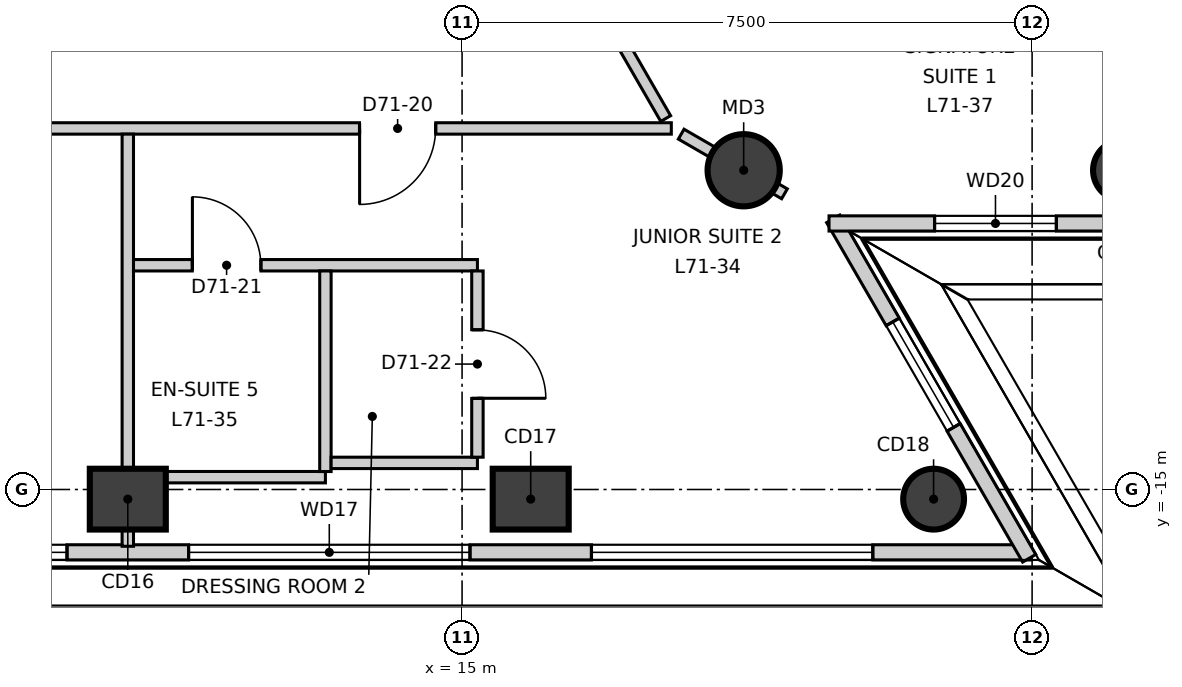
"""IFC4 building model, lengths in metres.
Left out: names, types, materials, properties, quantities, classifications, styles, units other than length and angle.
Written with IfcOpenShell. Run it as: python <this file> out.ifc"""

import sys

from ifc_helpers import new_model, si_unit, direction, frame, frame_2d, origin, origin_2d, place, context, subcontext, project, spatial, rectangle, circle, extrude, element, fill, save


model = new_model("IFC4")
c1 = context("Model", 3, precision=1e-05, world=origin(), true_north=direction((0.0, 1.0)))
c2 = subcontext(c1, "Body", "Model", "MODEL_VIEW")
j1 = project(units=[si_unit("LENGTHUNIT", "METRE"), si_unit("PLANEANGLEUNIT", "RADIAN")], contexts=[c1])
p1 = place(None, origin())
s1 = spatial("IfcSite", under=j1, at=p1, CompositionType="ELEMENT")
p2 = place(p1, origin())
s2 = spatial("IfcBuilding", under=s1, at=p2, CompositionType="ELEMENT")
p3 = place(p2, frame((0.0, 0.0, 300.7)))
s3 = spatial("IfcBuildingStorey", under=s2, at=p3, CompositionType="ELEMENT", Elevation=300.7)
for number, where, z_axis, x_axis in (
    (1, (10.602, -15.127, -0.3), (0.0, 0.0, 1.0), (1.0, 0.0, 0.0)),
    (2, (15.903, -15.127, -0.3), (0.0, 0.0, 1.0), (1.0, 0.0, 0.0)),
):
    element("IfcColumn", number, at=place(p3, frame(where, z_axis=z_axis, x_axis=x_axis)), inside=s3, PredefinedType="COLUMN", context=c2, shape_type="SweptSolid", body=[
        extrude(rectangle(XDim=1.0, YDim=0.8, at=origin_2d()), origin(), (0.0, 0.0, 1.0), 3.6),
    ])
for number, where, z_axis, x_axis in (
    (3, (21.204, -15.127, -0.3), (0.0, 0.0, 1.0), (1.0, 0.0, 0.0)),
    (4, (23.702, -10.8, -0.3), (0.0, 0.0, 1.0), (-0.5, 0.866, 0.0)),
):
    element("IfcColumn", number, at=place(p3, frame(where, z_axis=z_axis, x_axis=x_axis)), inside=s3, PredefinedType="COLUMN", context=c2, shape_type="SweptSolid", body=[
        extrude(circle(Radius=0.4, at=origin_2d()), origin(), (0.0, 0.0, 1.0), 3.6),
    ])
p4 = place(p3, frame((18.705, -10.8, -0.3), z_axis=(0.0, 0.0, 1.0), x_axis=(1.0, 0.0, 0.0)))
e5 = element("IfcColumn", 5, at=p4, inside=s3, PredefinedType="COLUMN", context=c2, shape_type="SweptSolid", body=[
    extrude(circle(Radius=0.475, at=origin_2d()), origin(), (0.0, 0.0, 1.0), 3.6),
])
p5 = place(p3, frame((-22.507, -15.827, 0.0), z_axis=(0.0, 0.0, 1.0), x_axis=(1.0, 0.0, 0.0)))
e6 = element("IfcWall", 6, at=p5, inside=s3, PredefinedType="ELEMENTEDWALL", context=c2, shape_type="SweptSolid", body=[
    extrude(rectangle(XDim=44.994, YDim=0.2, at=frame_2d((22.497, 0.0))), origin(), (0.0, 0.0, 1.0), 3.3),
])
p6 = place(p5, frame((2.104, 0.0, 0.9)))
e7 = element("IfcOpeningElement", 7, at=p6, cuts=e6, PredefinedType="OPENING", context=c2, shape_type="SweptSolid", body=[
    extrude(rectangle(XDim=3.7, YDim=2.2, at=frame_2d((1.85, 1.1))), frame((0.0, 0.11, 0.0), z_axis=(0.0, -1.0, 0.0), x_axis=(1.0, 0.0, 0.0)), (0.0, 0.0, 1.0), 0.22),
])
p7 = place(p5, frame((7.405, 0.0, 0.9)))
e8 = element("IfcOpeningElement", 8, at=p7, cuts=e6, PredefinedType="OPENING", context=c2, shape_type="SweptSolid", body=[
    extrude(rectangle(XDim=3.7, YDim=2.2, at=frame_2d((1.85, 1.1))), frame((0.0, 0.11, 0.0), z_axis=(0.0, -1.0, 0.0), x_axis=(1.0, 0.0, 0.0)), (0.0, 0.0, 1.0), 0.22),
])
p8 = place(p5, frame((12.706, 0.0, 0.9)))
e9 = element("IfcOpeningElement", 9, at=p8, cuts=e6, PredefinedType="OPENING", context=c2, shape_type="SweptSolid", body=[
    extrude(rectangle(XDim=3.7, YDim=2.2, at=frame_2d((1.85, 1.1))), frame((0.0, 0.11, 0.0), z_axis=(0.0, -1.0, 0.0), x_axis=(1.0, 0.0, 0.0)), (0.0, 0.0, 1.0), 0.22),
])
p9 = place(p5, frame((18.006, 0.0, 0.9)))
e10 = element("IfcOpeningElement", 10, at=p9, cuts=e6, PredefinedType="OPENING", context=c2, shape_type="SweptSolid", body=[
    extrude(rectangle(XDim=3.7, YDim=2.2, at=frame_2d((1.85, 1.1))), frame((0.0, 0.11, 0.0), z_axis=(0.0, -1.0, 0.0), x_axis=(1.0, 0.0, 0.0)), (0.0, 0.0, 1.0), 0.22),
])
p10 = place(p5, frame((23.308, 0.0, 0.9)))
e11 = element("IfcOpeningElement", 11, at=p10, cuts=e6, PredefinedType="OPENING", context=c2, shape_type="SweptSolid", body=[
    extrude(rectangle(XDim=3.7, YDim=2.2, at=frame_2d((1.85, 1.1))), frame((0.0, 0.11, 0.0), z_axis=(0.0, -1.0, 0.0), x_axis=(1.0, 0.0, 0.0)), (0.0, 0.0, 1.0), 0.22),
])
p11 = place(p5, frame((28.608, 0.0, 0.9)))
e12 = element("IfcOpeningElement", 12, at=p11, cuts=e6, PredefinedType="OPENING", context=c2, shape_type="SweptSolid", body=[
    extrude(rectangle(XDim=3.7, YDim=2.2, at=frame_2d((1.85, 1.1))), frame((0.0, 0.11, 0.0), z_axis=(0.0, -1.0, 0.0), x_axis=(1.0, 0.0, 0.0)), (0.0, 0.0, 1.0), 0.22),
])
p12 = place(p5, frame((33.91, 0.0, 0.9)))
e13 = element("IfcOpeningElement", 13, at=p12, cuts=e6, PredefinedType="OPENING", context=c2, shape_type="SweptSolid", body=[
    extrude(rectangle(XDim=3.7, YDim=2.2, at=frame_2d((1.85, 1.1))), frame((0.0, 0.11, 0.0), z_axis=(0.0, -1.0, 0.0), x_axis=(1.0, 0.0, 0.0)), (0.0, 0.0, 1.0), 0.22),
])
p13 = place(p5, frame((39.21, 0.0, 0.9)))
e14 = element("IfcOpeningElement", 14, at=p13, cuts=e6, PredefinedType="OPENING", context=c2, shape_type="SweptSolid", body=[
    extrude(rectangle(XDim=3.7, YDim=2.2, at=frame_2d((1.85, 1.1))), frame((0.0, 0.11, 0.0), z_axis=(0.0, -1.0, 0.0), x_axis=(1.0, 0.0, 0.0)), (0.0, 0.0, 1.0), 0.22),
])
p14 = place(p3, frame((22.462, -15.905, 0.0), z_axis=(0.0, 0.0, 1.0), x_axis=(-0.500054376048, 0.865994007483, 0.0)))
e15 = element("IfcWall", 15, at=p14, inside=s3, PredefinedType="ELEMENTEDWALL", context=c2, shape_type="SweptSolid", body=[
    extrude(rectangle(XDim=5.157, YDim=0.2, at=frame_2d((2.579, 0.0))), origin(), (0.0, 0.0, 1.0), 3.3),
])
p15 = place(p14, frame((1.99, 0.0, 0.9)))
e16 = element("IfcOpeningElement", 16, at=p15, cuts=e15, PredefinedType="OPENING", context=c2, shape_type="SweptSolid", body=[
    extrude(rectangle(XDim=1.6, YDim=2.2, at=frame_2d((0.8, 1.1))), frame((0.0, 0.11, 0.0), z_axis=(0.0, -1.0, 0.0), x_axis=(1.0, 0.0, 0.0)), (0.0, 0.0, 1.0), 0.22),
])
p16 = place(p3, frame((19.828, -11.5, 0.0), z_axis=(0.0, 0.0, 1.0), x_axis=(1.0, 0.0, 0.0)))
e17 = element("IfcWall", 17, at=p16, inside=s3, PredefinedType="ELEMENTEDWALL", context=c2, shape_type="SweptSolid", body=[
    extrude(rectangle(XDim=5.157, YDim=0.2, at=frame_2d((2.579, 0.0))), origin(), (0.0, 0.0, 1.0), 3.3),
])
p17 = place(p16, frame((1.39, 0.0, 0.9)))
e18 = element("IfcOpeningElement", 18, at=p17, cuts=e17, PredefinedType="OPENING", context=c2, shape_type="SweptSolid", body=[
    extrude(rectangle(XDim=1.6, YDim=2.2, at=frame_2d((0.8, 1.1))), frame((0.0, 0.11, 0.0), z_axis=(0.0, -1.0, 0.0), x_axis=(1.0, 0.0, 0.0)), (0.0, 0.0, 1.0), 0.22),
])
p18 = place(p3, frame((24.96, -11.578, 0.0), z_axis=(0.0, 0.0, 1.0), x_axis=(-0.500002391419, 0.866024023094, 0.0)))
e19 = element("IfcWall", 19, at=p18, inside=s3, PredefinedType="ELEMENTEDWALL", context=c2, shape_type="SweptSolid", body=[
    extrude(rectangle(XDim=44.994, YDim=0.2, at=frame_2d((22.497, 0.0))), origin(), (0.0, 0.0, 1.0), 3.3),
])
p19 = place(p18, frame((2.103, 0.0, 0.9)))
e20 = element("IfcOpeningElement", 20, at=p19, cuts=e19, PredefinedType="OPENING", context=c2, shape_type="SweptSolid", body=[
    extrude(rectangle(XDim=3.7, YDim=2.2, at=frame_2d((1.85, 1.1))), frame((0.0, 0.11, 0.0), z_axis=(0.0, -1.0, 0.0), x_axis=(1.0, 0.0, 0.0)), (0.0, 0.0, 1.0), 0.22),
])
p20 = place(p18, frame((7.404, 0.0, 0.9)))
e21 = element("IfcOpeningElement", 21, at=p20, cuts=e19, PredefinedType="OPENING", context=c2, shape_type="SweptSolid", body=[
    extrude(rectangle(XDim=3.7, YDim=2.2, at=frame_2d((1.85, 1.1))), frame((0.0, 0.11, 0.0), z_axis=(0.0, -1.0, 0.0), x_axis=(1.0, 0.0, 0.0)), (0.0, 0.0, 1.0), 0.22),
])
p21 = place(p18, frame((12.705, 0.0, 0.9)))
e22 = element("IfcOpeningElement", 22, at=p21, cuts=e19, PredefinedType="OPENING", context=c2, shape_type="SweptSolid", body=[
    extrude(rectangle(XDim=3.7, YDim=2.2, at=frame_2d((1.85, 1.1))), frame((0.0, 0.11, 0.0), z_axis=(0.0, -1.0, 0.0), x_axis=(1.0, 0.0, 0.0)), (0.0, 0.0, 1.0), 0.22),
])
p22 = place(p18, frame((18.006, 0.0, 0.9)))
e23 = element("IfcOpeningElement", 23, at=p22, cuts=e19, PredefinedType="OPENING", context=c2, shape_type="SweptSolid", body=[
    extrude(rectangle(XDim=3.7, YDim=2.2, at=frame_2d((1.85, 1.1))), frame((0.0, 0.11, 0.0), z_axis=(0.0, -1.0, 0.0), x_axis=(1.0, 0.0, 0.0)), (0.0, 0.0, 1.0), 0.22),
])
p23 = place(p18, frame((23.308, 0.0, 0.9)))
e24 = element("IfcOpeningElement", 24, at=p23, cuts=e19, PredefinedType="OPENING", context=c2, shape_type="SweptSolid", body=[
    extrude(rectangle(XDim=3.7, YDim=2.2, at=frame_2d((1.85, 1.1))), frame((0.0, 0.11, 0.0), z_axis=(0.0, -1.0, 0.0), x_axis=(1.0, 0.0, 0.0)), (0.0, 0.0, 1.0), 0.22),
])
p24 = place(p18, frame((28.609, 0.0, 0.9)))
e25 = element("IfcOpeningElement", 25, at=p24, cuts=e19, PredefinedType="OPENING", context=c2, shape_type="SweptSolid", body=[
    extrude(rectangle(XDim=3.7, YDim=2.2, at=frame_2d((1.85, 1.1))), frame((0.0, 0.11, 0.0), z_axis=(0.0, -1.0, 0.0), x_axis=(1.0, 0.0, 0.0)), (0.0, 0.0, 1.0), 0.22),
])
p25 = place(p18, frame((33.91, 0.0, 0.9)))
e26 = element("IfcOpeningElement", 26, at=p25, cuts=e19, PredefinedType="OPENING", context=c2, shape_type="SweptSolid", body=[
    extrude(rectangle(XDim=3.7, YDim=2.2, at=frame_2d((1.85, 1.1))), frame((0.0, 0.11, 0.0), z_axis=(0.0, -1.0, 0.0), x_axis=(1.0, 0.0, 0.0)), (0.0, 0.0, 1.0), 0.22),
])
p26 = place(p18, frame((39.211, 0.0, 0.9)))
e27 = element("IfcOpeningElement", 27, at=p26, cuts=e19, PredefinedType="OPENING", context=c2, shape_type="SweptSolid", body=[
    extrude(rectangle(XDim=3.7, YDim=2.2, at=frame_2d((1.85, 1.1))), frame((0.0, 0.11, 0.0), z_axis=(0.0, -1.0, 0.0), x_axis=(1.0, 0.0, 0.0)), (0.0, 0.0, 1.0), 0.22),
])
p27 = place(p3, frame((-17.603, -10.25, 0.0), z_axis=(0.0, 0.0, 1.0), x_axis=(1.0, 0.0, 0.0)))
e28 = element("IfcWall", 28, at=p27, inside=s3, PredefinedType="PARTITIONING", context=c2, shape_type="SweptSolid", body=[
    extrude(rectangle(XDim=35.356, YDim=0.15, at=frame_2d((17.678, 0.0))), origin(), (0.0, 0.0, 1.0), 3.3),
])
p28 = place(p27, frame((2.9, 0.0, 0.0)))
e29 = element("IfcOpeningElement", 29, at=p28, cuts=e28, PredefinedType="OPENING", context=c2, shape_type="SweptSolid", body=[
    extrude(rectangle(XDim=1.0, YDim=2.1, at=frame_2d((0.5, 1.05))), frame((0.0, 0.085, 0.0), z_axis=(0.0, -1.0, 0.0), x_axis=(1.0, 0.0, 0.0)), (0.0, 0.0, 1.0), 0.17),
])
p29 = place(p27, frame((10.351, 0.0, 0.0)))
e30 = element("IfcOpeningElement", 30, at=p29, cuts=e28, PredefinedType="OPENING", context=c2, shape_type="SweptSolid", body=[
    extrude(rectangle(XDim=1.0, YDim=2.1, at=frame_2d((0.5, 1.05))), frame((0.0, 0.085, 0.0), z_axis=(0.0, -1.0, 0.0), x_axis=(1.0, 0.0, 0.0)), (0.0, 0.0, 1.0), 0.17),
])
p30 = place(p27, frame((15.652, 0.0, 0.0)))
e31 = element("IfcOpeningElement", 31, at=p30, cuts=e28, PredefinedType="OPENING", context=c2, shape_type="SweptSolid", body=[
    extrude(rectangle(XDim=1.0, YDim=2.1, at=frame_2d((0.5, 1.05))), frame((0.0, 0.085, 0.0), z_axis=(0.0, -1.0, 0.0), x_axis=(1.0, 0.0, 0.0)), (0.0, 0.0, 1.0), 0.17),
])
p31 = place(p27, frame((24.753, 0.0, 0.0)))
e32 = element("IfcOpeningElement", 32, at=p31, cuts=e28, PredefinedType="OPENING", context=c2, shape_type="SweptSolid", body=[
    extrude(rectangle(XDim=1.0, YDim=2.1, at=frame_2d((0.5, 1.05))), frame((0.0, 0.085, 0.0), z_axis=(0.0, -1.0, 0.0), x_axis=(1.0, 0.0, 0.0)), (0.0, 0.0, 1.0), 0.17),
])
p32 = place(p27, frame((31.255, 0.0, 0.0)))
e33 = element("IfcOpeningElement", 33, at=p32, cuts=e28, PredefinedType="OPENING", context=c2, shape_type="SweptSolid", body=[
    extrude(rectangle(XDim=1.0, YDim=2.1, at=frame_2d((0.5, 1.05))), frame((0.0, 0.085, 0.0), z_axis=(0.0, -1.0, 0.0), x_axis=(1.0, 0.0, 0.0)), (0.0, 0.0, 1.0), 0.17),
])
p33 = place(p3, frame((17.883, -10.325, 0.0), z_axis=(0.0, 0.0, 1.0), x_axis=(0.865859083376, -0.500287964811, 0.0)))
e34 = element("IfcWall", 34, at=p33, inside=s3, PredefinedType="PARTITIONING", context=c2, shape_type="SweptSolid", body=[
    extrude(rectangle(XDim=1.569, YDim=0.15, at=frame_2d((0.785, 0.0))), origin(), (0.0, 0.0, 1.0), 2.8),
])
p34 = place(p3, frame((0.075, 20.37, 0.0), z_axis=(0.0, 0.0, 1.0), x_axis=(0.500009775255, -0.866019759965, 0.0)))
e35 = element("IfcWall", 35, at=p34, inside=s3, PredefinedType="PARTITIONING", context=c2, shape_type="SweptSolid", body=[
    extrude(rectangle(XDim=35.207, YDim=0.15, at=frame_2d((17.604, 0.0))), origin(), (0.0, 0.0, 1.0), 3.3),
])
p35 = place(p34, frame((31.307, 0.0, 0.0)))
e36 = element("IfcOpeningElement", 36, at=p35, cuts=e35, PredefinedType="OPENING", context=c2, shape_type="SweptSolid", body=[
    extrude(rectangle(XDim=1.0, YDim=2.1, at=frame_2d((0.5, 1.05))), frame((0.0, 0.085, 0.0), z_axis=(0.0, -1.0, 0.0), x_axis=(1.0, 0.0, 0.0)), (0.0, 0.0, 1.0), 0.17),
])
p36 = place(p34, frame((20.355, 0.0, 0.0)))
e37 = element("IfcOpeningElement", 37, at=p36, cuts=e35, PredefinedType="OPENING", context=c2, shape_type="SweptSolid", body=[
    extrude(rectangle(XDim=1.0, YDim=2.1, at=frame_2d((0.5, 1.05))), frame((0.0, 0.085, 0.0), z_axis=(0.0, -1.0, 0.0), x_axis=(1.0, 0.0, 0.0)), (0.0, 0.0, 1.0), 0.17),
])
p37 = place(p34, frame((24.355, 0.0, 0.0)))
e38 = element("IfcOpeningElement", 38, at=p37, cuts=e35, PredefinedType="OPENING", context=c2, shape_type="SweptSolid", body=[
    extrude(rectangle(XDim=0.9, YDim=2.1, at=frame_2d((0.45, 1.05))), frame((0.0, 0.085, 0.0), z_axis=(0.0, -1.0, 0.0), x_axis=(1.0, 0.0, 0.0)), (0.0, 0.0, 1.0), 0.17),
])
p38 = place(p34, frame((22.255, 0.0, 0.0)))
e39 = element("IfcOpeningElement", 39, at=p38, cuts=e35, PredefinedType="OPENING", context=c2, shape_type="SweptSolid", body=[
    extrude(rectangle(XDim=0.9, YDim=2.1, at=frame_2d((0.45, 1.05))), frame((0.0, 0.085, 0.0), z_axis=(0.0, -1.0, 0.0), x_axis=(1.0, 0.0, 0.0)), (0.0, 0.0, 1.0), 0.17),
])
p39 = place(p34, frame((8.453, 0.0, 0.0)))
e40 = element("IfcOpeningElement", 40, at=p39, cuts=e35, PredefinedType="OPENING", context=c2, shape_type="SweptSolid", body=[
    extrude(rectangle(XDim=1.0, YDim=2.1, at=frame_2d((0.5, 1.05))), frame((0.0, 0.085, 0.0), z_axis=(0.0, -1.0, 0.0), x_axis=(1.0, 0.0, 0.0)), (0.0, 0.0, 1.0), 0.17),
])
p40 = place(p34, frame((13.753, 0.0, 0.0)))
e41 = element("IfcOpeningElement", 41, at=p40, cuts=e35, PredefinedType="OPENING", context=c2, shape_type="SweptSolid", body=[
    extrude(rectangle(XDim=0.9, YDim=2.1, at=frame_2d((0.45, 1.05))), frame((0.0, 0.085, 0.0), z_axis=(0.0, -1.0, 0.0), x_axis=(1.0, 0.0, 0.0)), (0.0, 0.0, 1.0), 0.17),
])
p41 = place(p34, frame((11.553, 0.0, 0.0)))
e42 = element("IfcOpeningElement", 42, at=p41, cuts=e35, PredefinedType="OPENING", context=c2, shape_type="SweptSolid", body=[
    extrude(rectangle(XDim=0.9, YDim=2.1, at=frame_2d((0.45, 1.05))), frame((0.0, 0.085, 0.0), z_axis=(0.0, -1.0, 0.0), x_axis=(1.0, 0.0, 0.0)), (0.0, 0.0, 1.0), 0.17),
])
p42 = place(p34, frame((2.951, 0.0, 0.0)))
e43 = element("IfcOpeningElement", 43, at=p42, cuts=e35, PredefinedType="OPENING", context=c2, shape_type="SweptSolid", body=[
    extrude(rectangle(XDim=1.0, YDim=2.1, at=frame_2d((0.5, 1.05))), frame((0.0, 0.085, 0.0), z_axis=(0.0, -1.0, 0.0), x_axis=(1.0, 0.0, 0.0)), (0.0, 0.0, 1.0), 0.17),
])
p43 = place(p3, frame((10.602, -15.747, 0.0), z_axis=(0.0, 0.0, 1.0), x_axis=(0.0, 1.0, 0.0)))
e44 = element("IfcWall", 44, at=p43, inside=s3, PredefinedType="PARTITIONING", context=c2, shape_type="SweptSolid", body=[
    extrude(rectangle(XDim=5.422, YDim=0.15, at=frame_2d((2.711, 0.0))), origin(), (0.0, 0.0, 1.0), 3.3),
])
p44 = place(p3, frame((10.677, -12.05, 0.0), z_axis=(0.0, 0.0, 1.0), x_axis=(1.0, 0.0, 0.0)))
e45 = element("IfcWall", 45, at=p44, inside=s3, PredefinedType="PARTITIONING", context=c2, shape_type="SweptSolid", body=[
    extrude(rectangle(XDim=4.525, YDim=0.15, at=frame_2d((2.262, 0.0))), origin(), (0.0, 0.0, 1.0), 3.3),
])
p45 = place(p44, frame((0.775, 0.0, 0.0)))
e46 = element("IfcOpeningElement", 46, at=p45, cuts=e45, PredefinedType="OPENING", context=c2, shape_type="SweptSolid", body=[
    extrude(rectangle(XDim=0.9, YDim=2.1, at=frame_2d((0.45, 1.05))), frame((0.0, 0.085, 0.0), z_axis=(0.0, -1.0, 0.0), x_axis=(1.0, 0.0, 0.0)), (0.0, 0.0, 1.0), 0.17),
])
p46 = place(p3, frame((10.677, -14.838, 0.0), z_axis=(0.0, 0.0, 1.0), x_axis=(1.0, 0.0, 0.0)))
e47 = element("IfcWall", 47, at=p46, inside=s3, PredefinedType="PARTITIONING", context=c2, shape_type="SweptSolid", body=[
    extrude(rectangle(XDim=2.525, YDim=0.15, at=frame_2d((1.262, 0.0))), origin(), (0.0, 0.0, 1.0), 2.6),
])
p47 = place(p3, frame((13.202, -14.764, 0.0), z_axis=(0.0, 0.0, 1.0), x_axis=(0.0, 1.0, 0.0)))
e48 = element("IfcWall", 48, at=p47, inside=s3, PredefinedType="PARTITIONING", context=c2, shape_type="SweptSolid", body=[
    extrude(rectangle(XDim=2.639, YDim=0.15, at=frame_2d((1.319, 0.0))), origin(), (0.0, 0.0, 1.0), 3.3),
])
p48 = place(p3, frame((13.277, -14.65, 0.0), z_axis=(0.0, 0.0, 1.0), x_axis=(1.0, 0.0, 0.0)))
e49 = element("IfcWall", 49, at=p48, inside=s3, PredefinedType="PARTITIONING", context=c2, shape_type="SweptSolid", body=[
    extrude(rectangle(XDim=1.925, YDim=0.15, at=frame_2d((0.962, 0.0))), origin(), (0.0, 0.0, 1.0), 2.6),
])
p49 = place(p3, frame((15.202, -14.575, 0.0), z_axis=(0.0, 0.0, 1.0), x_axis=(0.0, 1.0, 0.0)))
e50 = element("IfcWall", 50, at=p49, inside=s3, PredefinedType="PARTITIONING", context=c2, shape_type="SweptSolid", body=[
    extrude(rectangle(XDim=2.45, YDim=0.15, at=frame_2d((1.225, 0.0))), origin(), (0.0, 0.0, 1.0), 3.3),
])
p50 = place(p49, frame((0.775, 0.0, 0.0)))
e51 = element("IfcOpeningElement", 51, at=p50, cuts=e50, PredefinedType="OPENING", context=c2, shape_type="SweptSolid", body=[
    extrude(rectangle(XDim=0.9, YDim=2.1, at=frame_2d((0.45, 1.05))), frame((0.0, 0.085, 0.0), z_axis=(0.0, -1.0, 0.0), x_axis=(1.0, 0.0, 0.0)), (0.0, 0.0, 1.0), 0.17),
])
p51 = place(p11, origin())
e52 = element("IfcWindow", 52, at=p51, inside=s3, PartitioningType="SINGLE_PANEL", PredefinedType="WINDOW", context=c2, shape_type="SweptSolid", body=[
    extrude(rectangle(XDim=3.7, YDim=2.2, at=frame_2d((1.85, 1.1))), frame((0.0, 0.03, 0.0), z_axis=(0.0, -1.0, 0.0), x_axis=(1.0, 0.0, 0.0)), (0.0, 0.0, 1.0), 0.06),
])
fill(e12, e52)
p52 = place(p12, origin())
e53 = element("IfcWindow", 53, at=p52, inside=s3, PartitioningType="SINGLE_PANEL", PredefinedType="WINDOW", context=c2, shape_type="SweptSolid", body=[
    extrude(rectangle(XDim=3.7, YDim=2.2, at=frame_2d((1.85, 1.1))), frame((0.0, 0.03, 0.0), z_axis=(0.0, -1.0, 0.0), x_axis=(1.0, 0.0, 0.0)), (0.0, 0.0, 1.0), 0.06),
])
fill(e13, e53)
p53 = place(p13, origin())
e54 = element("IfcWindow", 54, at=p53, inside=s3, PartitioningType="SINGLE_PANEL", PredefinedType="WINDOW", context=c2, shape_type="SweptSolid", body=[
    extrude(rectangle(XDim=3.7, YDim=2.2, at=frame_2d((1.85, 1.1))), frame((0.0, 0.03, 0.0), z_axis=(0.0, -1.0, 0.0), x_axis=(1.0, 0.0, 0.0)), (0.0, 0.0, 1.0), 0.06),
])
fill(e14, e54)
p54 = place(p15, origin())
e55 = element("IfcWindow", 55, at=p54, inside=s3, PartitioningType="SINGLE_PANEL", PredefinedType="WINDOW", context=c2, shape_type="SweptSolid", body=[
    extrude(rectangle(XDim=1.6, YDim=2.2, at=frame_2d((0.8, 1.1))), frame((0.0, 0.03, 0.0), z_axis=(0.0, -1.0, 0.0), x_axis=(1.0, 0.0, 0.0)), (0.0, 0.0, 1.0), 0.06),
])
fill(e16, e55)
p55 = place(p17, origin())
e56 = element("IfcWindow", 56, at=p55, inside=s3, PartitioningType="SINGLE_PANEL", PredefinedType="WINDOW", context=c2, shape_type="SweptSolid", body=[
    extrude(rectangle(XDim=1.6, YDim=2.2, at=frame_2d((0.8, 1.1))), frame((0.0, 0.03, 0.0), z_axis=(0.0, -1.0, 0.0), x_axis=(1.0, 0.0, 0.0)), (0.0, 0.0, 1.0), 0.06),
])
fill(e18, e56)
p56 = place(p19, origin())
e57 = element("IfcWindow", 57, at=p56, inside=s3, PartitioningType="SINGLE_PANEL", PredefinedType="WINDOW", context=c2, shape_type="SweptSolid", body=[
    extrude(rectangle(XDim=3.7, YDim=2.2, at=frame_2d((1.85, 1.1))), frame((0.0, 0.03, 0.0), z_axis=(0.0, -1.0, 0.0), x_axis=(1.0, 0.0, 0.0)), (0.0, 0.0, 1.0), 0.06),
])
fill(e20, e57)
p57 = place(p32, origin())
e58 = element("IfcDoor", 58, at=p57, inside=s3, OperationType="SINGLE_SWING_LEFT", PredefinedType="DOOR", context=c2, shape_type="SweptSolid", body=[
    extrude(rectangle(XDim=1.0, YDim=2.1, at=frame_2d((0.5, 1.05))), frame((0.0, 0.025, 0.0), z_axis=(0.0, -1.0, 0.0), x_axis=(1.0, 0.0, 0.0)), (0.0, 0.0, 1.0), 0.05),
])
fill(e33, e58)
p58 = place(p45, origin())
e59 = element("IfcDoor", 59, at=p58, inside=s3, OperationType="SINGLE_SWING_RIGHT", PredefinedType="DOOR", context=c2, shape_type="SweptSolid", body=[
    extrude(rectangle(XDim=0.9, YDim=2.1, at=frame_2d((0.45, 1.05))), frame((0.0, 0.025, 0.0), z_axis=(0.0, -1.0, 0.0), x_axis=(1.0, 0.0, 0.0)), (0.0, 0.0, 1.0), 0.05),
])
fill(e46, e59)
p59 = place(p50, origin())
e60 = element("IfcDoor", 60, at=p59, inside=s3, OperationType="SINGLE_SWING_LEFT", PredefinedType="DOOR", context=c2, shape_type="SweptSolid", body=[
    extrude(rectangle(XDim=0.9, YDim=2.1, at=frame_2d((0.45, 1.05))), frame((0.0, 0.025, 0.0), z_axis=(0.0, -1.0, 0.0), x_axis=(1.0, 0.0, 0.0)), (0.0, 0.0, 1.0), 0.05),
])
fill(e51, e60)
save(model, sys.argv[1])
